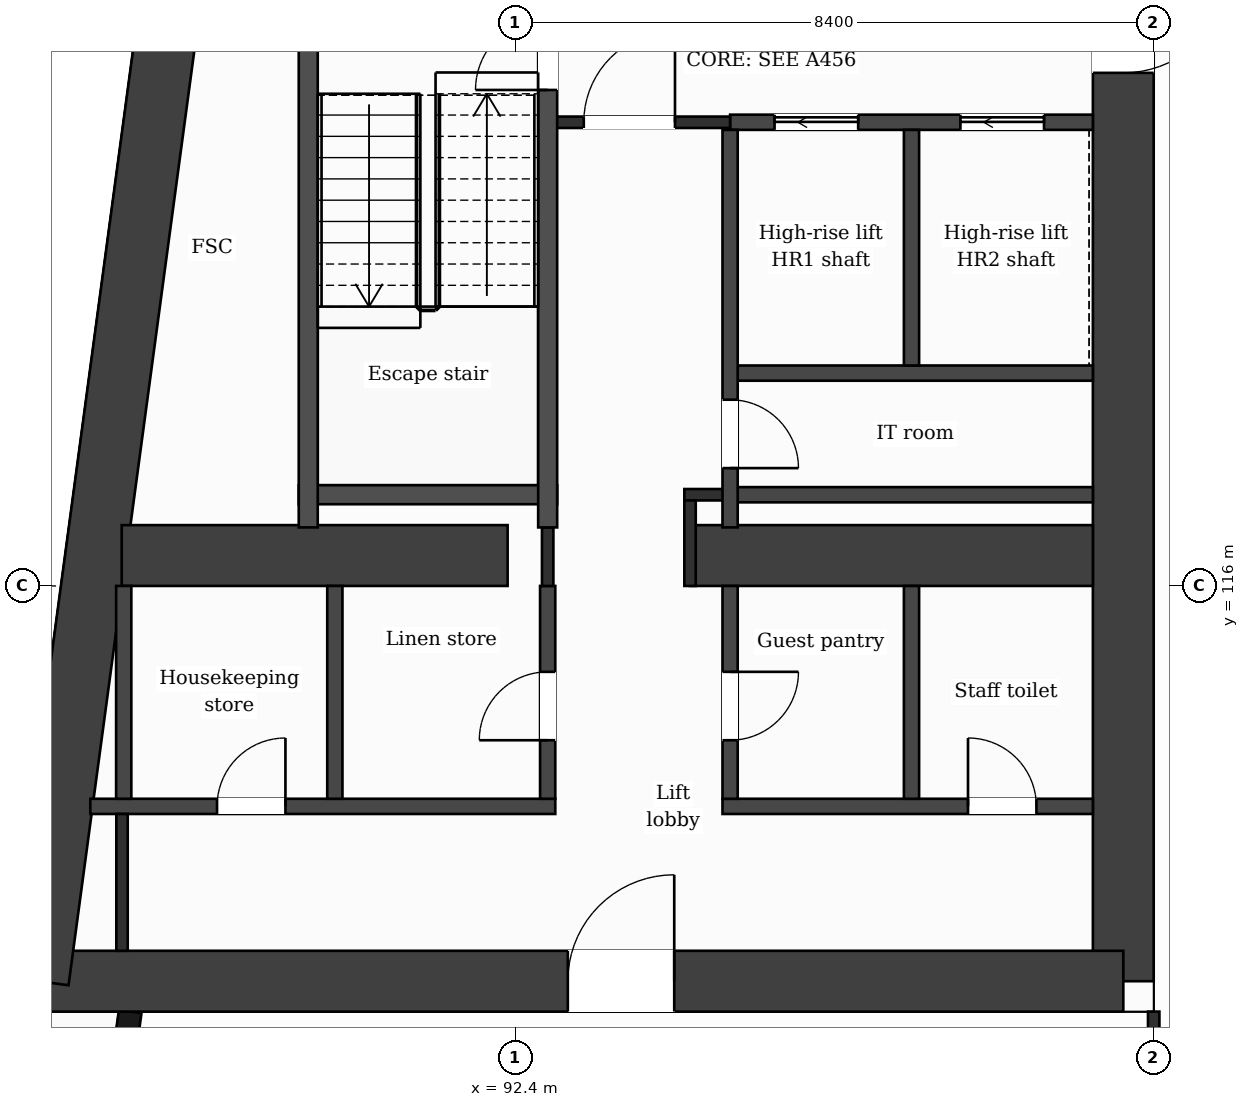
"""IFC4 building model, lengths in metres.
Left out: names, types, materials, properties, quantities, classifications, styles, units other than length and angle.
Written with IfcOpenShell. Run it as: python <this file> out.ifc"""

import sys

from ifc_helpers import new_model, si_unit, direction, frame, frame_2d, origin, place, context, subcontext, project, spatial, rectangle, extrude, element, fill, save


model = new_model("IFC4")
c1 = context("Model", 3, precision=1e-05, world=origin(), true_north=direction((0.0, 1.0)))
c2 = subcontext(c1, "Body", "Model", "MODEL_VIEW")
j1 = project(units=[si_unit("LENGTHUNIT", "METRE"), si_unit("PLANEANGLEUNIT", "RADIAN")], contexts=[c1])
p1 = place(None, origin())
s1 = spatial("IfcSite", under=j1, at=p1, CompositionType="ELEMENT")
p2 = place(p1, origin())
s2 = spatial("IfcBuilding", under=s1, at=p2, CompositionType="ELEMENT")
p3 = place(p2, frame((0.0, 0.0, 228.1)))
s3 = spatial("IfcBuildingStorey", under=s2, at=p3, CompositionType="ELEMENT", Elevation=228.1)
p4 = place(p3, frame((100.4, 132.0, 0.0), z_axis=(0.0, 0.0, 1.0), x_axis=(0.0, -1.0, 0.0)))
e1 = element("IfcWall", 1, at=p4, inside=s3, PredefinedType="SHEAR", context=c2, shape_type="SweptSolid", body=[
    extrude(rectangle(XDim=21.2, YDim=0.8, at=frame_2d((10.6, 0.0))), origin(), (0.0, 0.0, 1.0), 3.7),
])
p5 = place(p4, frame((7.85, 0.0, 0.0)))
e2 = element("IfcOpeningElement", 2, at=p5, cuts=e1, PredefinedType="OPENING", context=c2, shape_type="SweptSolid", body=[
    extrude(rectangle(XDim=1.4, YDim=2.1, at=frame_2d((0.7, 1.05))), frame((0.0, 0.41, 0.0), z_axis=(0.0, -1.0, 0.0), x_axis=(1.0, 0.0, 0.0)), (0.0, 0.0, 1.0), 0.82),
])
p6 = place(p3, frame((100.4, 110.8, 0.0), z_axis=(0.0, 0.0, 1.0), x_axis=(-1.0, 0.0, 0.0)))
e3 = element("IfcWall", 3, at=p6, inside=s3, PredefinedType="SHEAR", context=c2, shape_type="SweptSolid", body=[
    extrude(rectangle(XDim=14.273, YDim=0.8, at=frame_2d((7.137, 0.0))), origin(), (0.0, 0.0, 1.0), 3.7),
])
p7 = place(p6, frame((5.908, 0.0, 0.0)))
e4 = element("IfcOpeningElement", 4, at=p7, cuts=e3, PredefinedType="OPENING", context=c2, shape_type="SweptSolid", body=[
    extrude(rectangle(XDim=1.4, YDim=2.1, at=frame_2d((0.7, 1.05))), frame((0.0, 0.41, 0.0), z_axis=(0.0, -1.0, 0.0), x_axis=(1.0, 0.0, 0.0)), (0.0, 0.0, 1.0), 0.82),
])
p8 = place(p3, frame((86.127, 110.8, 0.0), z_axis=(0.0, 0.0, 1.0), x_axis=(0.133408347329, 0.991061154956, 0.0)))
e5 = element("IfcWall", 5, at=p8, inside=s3, PredefinedType="SHEAR", context=c2, shape_type="SweptSolid", body=[
    extrude(rectangle(XDim=21.391, YDim=0.8, at=frame_2d((10.696, 0.0))), origin(), (0.0, 0.0, 1.0), 3.7),
])
p9 = place(p3, frame((87.223, 116.4, 0.0), z_axis=(0.0, 0.0, 1.0), x_axis=(1.0, 0.0, 0.0)))
e6 = element("IfcWall", 6, at=p9, inside=s3, PredefinedType="SHEAR", context=c2, shape_type="SweptSolid", body=[
    extrude(rectangle(XDim=5.077, YDim=0.8, at=frame_2d((2.539, 0.0))), origin(), (0.0, 0.0, 1.0), 3.7),
])
p10 = place(p3, frame((94.7, 116.4, 0.0), z_axis=(0.0, 0.0, 1.0), x_axis=(1.0, 0.0, 0.0)))
e7 = element("IfcWall", 7, at=p10, inside=s3, PredefinedType="SHEAR", context=c2, shape_type="SweptSolid", body=[
    extrude(rectangle(XDim=5.3, YDim=0.8, at=frame_2d((2.65, 0.0))), origin(), (0.0, 0.0, 1.0), 3.7),
])
p11 = place(p3, frame((87.334, 110.4, 0.0), z_axis=(0.0, 0.0, 1.0), x_axis=(-0.133437175554, -0.991057273915, 0.0)))
e8 = element("IfcWall", 8, at=p11, inside=s3, PredefinedType="SOLIDWALL", context=c2, shape_type="SweptSolid", body=[
    extrude(rectangle(XDim=6.781, YDim=0.3, at=frame_2d((3.39, 0.0))), origin(), (0.0, 0.0, 1.0), 3.38),
])
p12 = place(p11, frame((1.418, 0.0, 0.0)))
e9 = element("IfcOpeningElement", 9, at=p12, cuts=e8, PredefinedType="OPENING", context=c2, shape_type="SweptSolid", body=[
    extrude(rectangle(XDim=1.2, YDim=2.4, at=frame_2d((0.6, 1.2))), frame((0.0, 0.16, 0.0), z_axis=(0.0, -1.0, 0.0), x_axis=(1.0, 0.0, 0.0)), (0.0, 0.0, 1.0), 0.32),
])
p13 = place(p11, frame((4.758, 0.0, 0.9)))
e10 = element("IfcOpeningElement", 10, at=p13, cuts=e8, PredefinedType="OPENING", context=c2, shape_type="SweptSolid", body=[
    extrude(rectangle(XDim=1.2, YDim=2.1, at=frame_2d((0.6, 1.05))), frame((0.0, 0.16, 0.0), z_axis=(0.0, -1.0, 0.0), x_axis=(1.0, 0.0, 0.0)), (0.0, 0.0, 1.0), 0.32),
])
p14 = place(p3, frame((86.81, 113.1, 0.0), z_axis=(0.0, 0.0, 1.0), x_axis=(1.0, 0.0, 0.0)))
e11 = element("IfcWall", 11, at=p14, inside=s3, PredefinedType="PARTITIONING", context=c2, shape_type="SweptSolid", body=[
    extrude(rectangle(XDim=6.117, YDim=0.2, at=frame_2d((3.059, 0.0))), origin(), (0.0, 0.0, 1.0), 3.38),
])
p15 = place(p14, frame((1.667, 0.0, 0.0)))
e12 = element("IfcOpeningElement", 12, at=p15, cuts=e11, PredefinedType="OPENING", context=c2, shape_type="SweptSolid", body=[
    extrude(rectangle(XDim=0.9, YDim=2.1, at=frame_2d((0.45, 1.05))), frame((0.0, 0.11, 0.0), z_axis=(0.0, -1.0, 0.0), x_axis=(1.0, 0.0, 0.0)), (0.0, 0.0, 1.0), 0.22),
])
p16 = place(p3, frame((95.127, 113.1, 0.0), z_axis=(0.0, 0.0, 1.0), x_axis=(1.0, 0.0, 0.0)))
e13 = element("IfcWall", 13, at=p16, inside=s3, PredefinedType="PARTITIONING", context=c2, shape_type="SweptSolid", body=[
    extrude(rectangle(XDim=4.873, YDim=0.2, at=frame_2d((2.437, 0.0))), origin(), (0.0, 0.0, 1.0), 3.38),
])
p17 = place(p16, frame((3.23, 0.0, 0.0)))
e14 = element("IfcOpeningElement", 14, at=p17, cuts=e13, PredefinedType="OPENING", context=c2, shape_type="SweptSolid", body=[
    extrude(rectangle(XDim=0.9, YDim=2.1, at=frame_2d((0.45, 1.05))), frame((0.0, 0.11, 0.0), z_axis=(0.0, -1.0, 0.0), x_axis=(1.0, 0.0, 0.0)), (0.0, 0.0, 1.0), 0.22),
])
p18 = place(p3, frame((95.227, 117.2, 0.0), z_axis=(0.0, 0.0, 1.0), x_axis=(1.0, 0.0, 0.0)))
e15 = element("IfcWall", 15, at=p18, inside=s3, PredefinedType="PARTITIONING", context=c2, shape_type="SweptSolid", body=[
    extrude(rectangle(XDim=4.773, YDim=0.2, at=frame_2d((2.386, 0.0))), origin(), (0.0, 0.0, 1.0), 3.38),
])
p19 = place(p3, frame((94.625, 117.2, 0.0), z_axis=(0.0, 0.0, 1.0), x_axis=(1.0, 0.0, 0.0)))
e16 = element("IfcWall", 16, at=p19, inside=s3, PredefinedType="PARTITIONING", context=c2, shape_type="SweptSolid", body=[
    extrude(rectangle(XDim=0.602, YDim=0.15, at=frame_2d((0.301, 0.0))), origin(), (0.0, 0.0, 1.0), 3.38),
])
p20 = place(p3, frame((89.552, 117.2, 0.0), z_axis=(0.0, 0.0, 1.0), x_axis=(1.0, 0.0, 0.0)))
e17 = element("IfcWall", 17, at=p20, inside=s3, PredefinedType="PARTITIONING", context=c2, shape_type="SweptSolid", body=[
    extrude(rectangle(XDim=3.4, YDim=0.25, at=frame_2d((1.7, 0.0))), origin(), (0.0, 0.0, 1.0), 3.38),
])
p21 = place(p3, frame((95.227, 118.8, 0.0), z_axis=(0.0, 0.0, 1.0), x_axis=(1.0, 0.0, 0.0)))
e18 = element("IfcWall", 18, at=p21, inside=s3, PredefinedType="PARTITIONING", context=c2, shape_type="SweptSolid", body=[
    extrude(rectangle(XDim=4.773, YDim=0.2, at=frame_2d((2.386, 0.0))), origin(), (0.0, 0.0, 1.0), 3.38),
])
p22 = place(p3, frame((95.227, 122.1, 0.0), z_axis=(0.0, 0.0, 1.0), x_axis=(1.0, 0.0, 0.0)))
e19 = element("IfcWall", 19, at=p22, inside=s3, PredefinedType="PARTITIONING", context=c2, shape_type="SweptSolid", body=[
    extrude(rectangle(XDim=4.773, YDim=0.2, at=frame_2d((2.386, 0.0))), origin(), (0.0, 0.0, 1.0), 3.38),
])
p23 = place(p22, frame((0.585, 0.0, 0.0)))
e20 = element("IfcOpeningElement", 20, at=p23, cuts=e19, PredefinedType="OPENING", context=c2, shape_type="SweptSolid", body=[
    extrude(rectangle(XDim=1.1, YDim=2.1, at=frame_2d((0.55, 1.05))), frame((0.0, 0.11, 0.0), z_axis=(0.0, -1.0, 0.0), x_axis=(1.0, 0.0, 0.0)), (0.0, 0.0, 1.0), 0.22),
])
p24 = place(p22, frame((3.03, 0.0, 0.0)))
e21 = element("IfcOpeningElement", 21, at=p24, cuts=e19, PredefinedType="OPENING", context=c2, shape_type="SweptSolid", body=[
    extrude(rectangle(XDim=1.1, YDim=2.1, at=frame_2d((0.55, 1.05))), frame((0.0, 0.11, 0.0), z_axis=(0.0, -1.0, 0.0), x_axis=(1.0, 0.0, 0.0)), (0.0, 0.0, 1.0), 0.22),
])
p25 = place(p3, frame((92.827, 122.1, 0.0), z_axis=(0.0, 0.0, 1.0), x_axis=(1.0, 0.0, 0.0)))
e22 = element("IfcWall", 22, at=p25, inside=s3, PredefinedType="PARTITIONING", context=c2, shape_type="SweptSolid", body=[
    extrude(rectangle(XDim=2.4, YDim=0.15, at=frame_2d((1.2, 0.0))), origin(), (0.0, 0.0, 1.0), 3.38),
])
p26 = place(p25, frame((0.475, 0.0, 0.0)))
e23 = element("IfcOpeningElement", 23, at=p26, cuts=e22, PredefinedType="OPENING", context=c2, shape_type="SweptSolid", body=[
    extrude(rectangle(XDim=1.2, YDim=2.1, at=frame_2d((0.6, 1.05))), frame((0.0, 0.085, 0.0), z_axis=(0.0, -1.0, 0.0), x_axis=(1.0, 0.0, 0.0)), (0.0, 0.0, 1.0), 0.17),
])
p27 = place(p3, frame((87.25, 113.2, 0.0), z_axis=(0.0, 0.0, 1.0), x_axis=(0.0, 1.0, 0.0)))
e24 = element("IfcWall", 24, at=p27, inside=s3, PredefinedType="PARTITIONING", context=c2, shape_type="SweptSolid", body=[
    extrude(rectangle(XDim=2.8, YDim=0.2, at=frame_2d((1.4, 0.0))), origin(), (0.0, 0.0, 1.0), 3.38),
])
p28 = place(p3, frame((87.227, 111.2, 0.0), z_axis=(0.0, 0.0, 1.0), x_axis=(0.0, 1.0, 0.0)))
e25 = element("IfcWall", 25, at=p28, inside=s3, PredefinedType="PARTITIONING", context=c2, shape_type="SweptSolid", body=[
    extrude(rectangle(XDim=1.8, YDim=0.15, at=frame_2d((0.9, 0.0))), origin(), (0.0, 0.0, 1.0), 3.38),
])
p29 = place(p3, frame((89.677, 116.77, 0.0), z_axis=(0.0, 0.0, 1.0), x_axis=(0.0, 1.0, 0.0)))
e26 = element("IfcWall", 26, at=p29, inside=s3, PredefinedType="PARTITIONING", context=c2, shape_type="SweptSolid", body=[
    extrude(rectangle(XDim=7.055, YDim=0.25, at=frame_2d((3.527, 0.0))), origin(), (0.0, 0.0, 1.0), 3.38),
])
p30 = place(p3, frame((90.027, 113.2, 0.0), z_axis=(0.0, 0.0, 1.0), x_axis=(0.0, 1.0, 0.0)))
e27 = element("IfcWall", 27, at=p30, inside=s3, PredefinedType="PARTITIONING", context=c2, shape_type="SweptSolid", body=[
    extrude(rectangle(XDim=2.8, YDim=0.2, at=frame_2d((1.4, 0.0))), origin(), (0.0, 0.0, 1.0), 3.38),
])
p31 = place(p3, frame((92.827, 113.2, 0.0), z_axis=(0.0, 0.0, 1.0), x_axis=(0.0, 1.0, 0.0)))
e28 = element("IfcWall", 28, at=p31, inside=s3, PredefinedType="PARTITIONING", context=c2, shape_type="SweptSolid", body=[
    extrude(rectangle(XDim=2.8, YDim=0.2, at=frame_2d((1.4, 0.0))), origin(), (0.0, 0.0, 1.0), 3.38),
])
p32 = place(p31, frame((0.77, 0.0, 0.0)))
e29 = element("IfcOpeningElement", 29, at=p32, cuts=e28, PredefinedType="OPENING", context=c2, shape_type="SweptSolid", body=[
    extrude(rectangle(XDim=0.9, YDim=2.1, at=frame_2d((0.45, 1.05))), frame((0.0, 0.11, 0.0), z_axis=(0.0, -1.0, 0.0), x_axis=(1.0, 0.0, 0.0)), (0.0, 0.0, 1.0), 0.22),
])
p33 = place(p3, frame((92.827, 116.0, 0.0), z_axis=(0.0, 0.0, 1.0), x_axis=(0.0, 1.0, 0.0)))
e30 = element("IfcWall", 30, at=p33, inside=s3, PredefinedType="PARTITIONING", context=c2, shape_type="SweptSolid", body=[
    extrude(rectangle(XDim=0.77, YDim=0.15, at=frame_2d((0.385, 0.0))), origin(), (0.0, 0.0, 1.0), 3.38),
])
p34 = place(p3, frame((92.827, 116.77, 0.0), z_axis=(0.0, 0.0, 1.0), x_axis=(0.0, 1.0, 0.0)))
e31 = element("IfcWall", 31, at=p34, inside=s3, PredefinedType="PARTITIONING", context=c2, shape_type="SweptSolid", body=[
    extrude(rectangle(XDim=7.055, YDim=0.25, at=frame_2d((3.527, 0.0))), origin(), (0.0, 0.0, 1.0), 3.38),
])
p35 = place(p34, frame((5.755, 0.0, 0.0)))
e32 = element("IfcOpeningElement", 32, at=p35, cuts=e31, PredefinedType="OPENING", context=c2, shape_type="SweptSolid", body=[
    extrude(rectangle(XDim=0.95, YDim=2.1, at=frame_2d((0.475, 1.05))), frame((0.0, 0.135, 0.0), z_axis=(0.0, -1.0, 0.0), x_axis=(1.0, 0.0, 0.0)), (0.0, 0.0, 1.0), 0.27),
])
p36 = place(p3, frame((94.7, 116.0, 0.0), z_axis=(0.0, 0.0, 1.0), x_axis=(0.0, 1.0, 0.0)))
e33 = element("IfcWall", 33, at=p36, inside=s3, PredefinedType="PARTITIONING", context=c2, shape_type="SweptSolid", body=[
    extrude(rectangle(XDim=1.125, YDim=0.15, at=frame_2d((0.562, 0.0))), origin(), (0.0, 0.0, 1.0), 3.38),
])
p37 = place(p3, frame((95.227, 113.2, 0.0), z_axis=(0.0, 0.0, 1.0), x_axis=(0.0, 1.0, 0.0)))
e34 = element("IfcWall", 34, at=p37, inside=s3, PredefinedType="PARTITIONING", context=c2, shape_type="SweptSolid", body=[
    extrude(rectangle(XDim=2.8, YDim=0.2, at=frame_2d((1.4, 0.0))), origin(), (0.0, 0.0, 1.0), 3.38),
])
p38 = place(p37, frame((0.77, 0.0, 0.0)))
e35 = element("IfcOpeningElement", 35, at=p38, cuts=e34, PredefinedType="OPENING", context=c2, shape_type="SweptSolid", body=[
    extrude(rectangle(XDim=0.9, YDim=2.1, at=frame_2d((0.45, 1.05))), frame((0.0, 0.11, 0.0), z_axis=(0.0, -1.0, 0.0), x_axis=(1.0, 0.0, 0.0)), (0.0, 0.0, 1.0), 0.22),
])
p39 = place(p3, frame((95.227, 116.77, 0.0), z_axis=(0.0, 0.0, 1.0), x_axis=(0.0, 1.0, 0.0)))
e36 = element("IfcWall", 36, at=p39, inside=s3, PredefinedType="PARTITIONING", context=c2, shape_type="SweptSolid", body=[
    extrude(rectangle(XDim=5.23, YDim=0.2, at=frame_2d((2.615, 0.0))), origin(), (0.0, 0.0, 1.0), 3.38),
])
p40 = place(p39, frame((0.78, 0.0, 0.0)))
e37 = element("IfcOpeningElement", 37, at=p40, cuts=e36, PredefinedType="OPENING", context=c2, shape_type="SweptSolid", body=[
    extrude(rectangle(XDim=0.9, YDim=2.1, at=frame_2d((0.45, 1.05))), frame((0.0, 0.11, 0.0), z_axis=(0.0, -1.0, 0.0), x_axis=(1.0, 0.0, 0.0)), (0.0, 0.0, 1.0), 0.22),
])
p41 = place(p3, frame((97.614, 113.2, 0.0), z_axis=(0.0, 0.0, 1.0), x_axis=(0.0, 1.0, 0.0)))
e38 = element("IfcWall", 38, at=p41, inside=s3, PredefinedType="PARTITIONING", context=c2, shape_type="SweptSolid", body=[
    extrude(rectangle(XDim=2.8, YDim=0.2, at=frame_2d((1.4, 0.0))), origin(), (0.0, 0.0, 1.0), 3.38),
])
p42 = place(p3, frame((97.614, 118.9, 0.0), z_axis=(0.0, 0.0, 1.0), x_axis=(0.0, 1.0, 0.0)))
e39 = element("IfcWall", 39, at=p42, inside=s3, PredefinedType="PARTITIONING", context=c2, shape_type="SweptSolid", body=[
    extrude(rectangle(XDim=3.1, YDim=0.2, at=frame_2d((1.55, 0.0))), origin(), (0.0, 0.0, 1.0), 3.38),
])
p43 = place(p3, frame((100.8, 109.075, 0.0), z_axis=(0.0, 0.0, 1.0), x_axis=(0.0, 1.0, 0.0)))
e40 = element("IfcWall", 40, at=p43, inside=s3, PredefinedType="PARTITIONING", context=c2, shape_type="SweptSolid", body=[
    extrude(rectangle(XDim=1.325, YDim=0.15, at=frame_2d((0.663, 0.0))), origin(), (0.0, 0.0, 1.0), 3.38),
])
p44 = place(p26, origin())
e41 = element("IfcDoor", 41, at=p44, inside=s3, OperationType="SINGLE_SWING_RIGHT", PredefinedType="DOOR", context=c2, shape_type="SweptSolid", body=[
    extrude(rectangle(XDim=1.2, YDim=2.1, at=frame_2d((0.6, 1.05))), frame((0.0, 0.025, 0.0), z_axis=(0.0, -1.0, 0.0), x_axis=(1.0, 0.0, 0.0)), (0.0, 0.0, 1.0), 0.05),
])
fill(e23, e41)
p45 = place(p23, origin())
e42 = element("IfcDoor", 42, at=p45, inside=s3, OperationType="SLIDING_TO_LEFT", PredefinedType="DOOR", context=c2, shape_type="SweptSolid", body=[
    extrude(rectangle(XDim=1.1, YDim=2.1, at=frame_2d((0.55, 1.05))), frame((0.0, 0.025, 0.0), z_axis=(0.0, -1.0, 0.0), x_axis=(1.0, 0.0, 0.0)), (0.0, 0.0, 1.0), 0.05),
])
fill(e20, e42)
p46 = place(p24, origin())
e43 = element("IfcDoor", 43, at=p46, inside=s3, OperationType="SLIDING_TO_LEFT", PredefinedType="DOOR", context=c2, shape_type="SweptSolid", body=[
    extrude(rectangle(XDim=1.1, YDim=2.1, at=frame_2d((0.55, 1.05))), frame((0.0, 0.025, 0.0), z_axis=(0.0, -1.0, 0.0), x_axis=(1.0, 0.0, 0.0)), (0.0, 0.0, 1.0), 0.05),
])
fill(e21, e43)
p47 = place(p35, origin())
e44 = element("IfcDoor", 44, at=p47, inside=s3, OperationType="SINGLE_SWING_LEFT", PredefinedType="DOOR", context=c2, shape_type="SweptSolid", body=[
    extrude(rectangle(XDim=0.95, YDim=2.1, at=frame_2d((0.475, 1.05))), frame((0.0, 0.025, 0.0), z_axis=(0.0, -1.0, 0.0), x_axis=(1.0, 0.0, 0.0)), (0.0, 0.0, 1.0), 0.05),
])
fill(e32, e44)
p48 = place(p40, origin())
e45 = element("IfcDoor", 45, at=p48, inside=s3, OperationType="SINGLE_SWING_LEFT", PredefinedType="DOOR", context=c2, shape_type="SweptSolid", body=[
    extrude(rectangle(XDim=0.9, YDim=2.1, at=frame_2d((0.45, 1.05))), frame((0.0, 0.025, 0.0), z_axis=(0.0, -1.0, 0.0), x_axis=(1.0, 0.0, 0.0)), (0.0, 0.0, 1.0), 0.05),
])
fill(e37, e45)
p49 = place(p15, origin())
e46 = element("IfcDoor", 46, at=p49, inside=s3, OperationType="SINGLE_SWING_RIGHT", PredefinedType="DOOR", context=c2, shape_type="SweptSolid", body=[
    extrude(rectangle(XDim=0.9, YDim=2.1, at=frame_2d((0.45, 1.05))), frame((0.0, 0.025, 0.0), z_axis=(0.0, -1.0, 0.0), x_axis=(1.0, 0.0, 0.0)), (0.0, 0.0, 1.0), 0.05),
])
fill(e12, e46)
p50 = place(p32, origin())
e47 = element("IfcDoor", 47, at=p50, inside=s3, OperationType="SINGLE_SWING_LEFT", PredefinedType="DOOR", context=c2, shape_type="SweptSolid", body=[
    extrude(rectangle(XDim=0.9, YDim=2.1, at=frame_2d((0.45, 1.05))), frame((0.0, 0.025, 0.0), z_axis=(0.0, -1.0, 0.0), x_axis=(1.0, 0.0, 0.0)), (0.0, 0.0, 1.0), 0.05),
])
fill(e29, e47)
p51 = place(p38, origin())
e48 = element("IfcDoor", 48, at=p51, inside=s3, OperationType="SINGLE_SWING_RIGHT", PredefinedType="DOOR", context=c2, shape_type="SweptSolid", body=[
    extrude(rectangle(XDim=0.9, YDim=2.1, at=frame_2d((0.45, 1.05))), frame((0.0, 0.025, 0.0), z_axis=(0.0, -1.0, 0.0), x_axis=(1.0, 0.0, 0.0)), (0.0, 0.0, 1.0), 0.05),
])
fill(e35, e48)
p52 = place(p17, origin())
e49 = element("IfcDoor", 49, at=p52, inside=s3, OperationType="SINGLE_SWING_LEFT", PredefinedType="DOOR", context=c2, shape_type="SweptSolid", body=[
    extrude(rectangle(XDim=0.9, YDim=2.1, at=frame_2d((0.45, 1.05))), frame((0.0, 0.025, 0.0), z_axis=(0.0, -1.0, 0.0), x_axis=(1.0, 0.0, 0.0)), (0.0, 0.0, 1.0), 0.05),
])
fill(e14, e49)
p53 = place(p7, origin())
e50 = element("IfcDoor", 50, at=p53, inside=s3, OperationType="SINGLE_SWING_LEFT", PredefinedType="DOOR", context=c2, shape_type="SweptSolid", body=[
    extrude(rectangle(XDim=1.4, YDim=2.1, at=frame_2d((0.7, 1.05))), frame((0.0, 0.025, 0.0), z_axis=(0.0, -1.0, 0.0), x_axis=(1.0, 0.0, 0.0)), (0.0, 0.0, 1.0), 0.05),
])
fill(e4, e50)
p54 = place(p5, origin())
e51 = element("IfcDoor", 51, at=p54, inside=s3, OperationType="SINGLE_SWING_LEFT", PredefinedType="DOOR", context=c2, shape_type="SweptSolid", body=[
    extrude(rectangle(XDim=1.4, YDim=2.1, at=frame_2d((0.7, 1.05))), frame((0.0, 0.025, 0.0), z_axis=(0.0, -1.0, 0.0), x_axis=(1.0, 0.0, 0.0)), (0.0, 0.0, 1.0), 0.05),
])
fill(e2, e51)
save(model, sys.argv[1])
